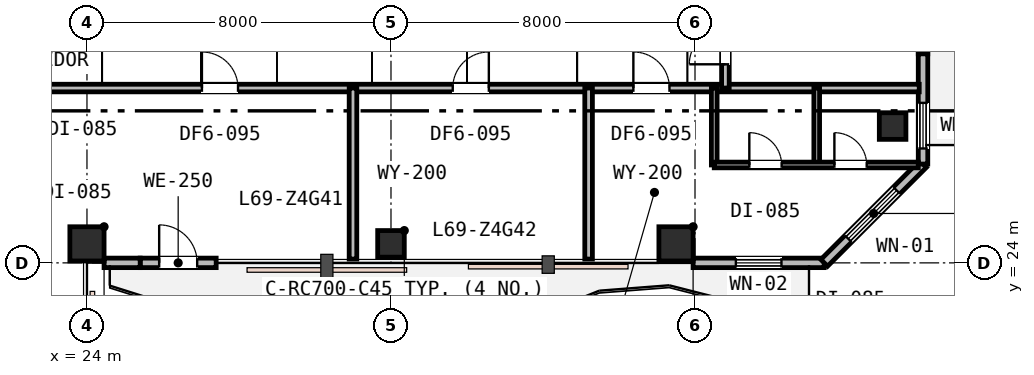
"""IFC4 building model, lengths in metres.
Left out: names, types, materials, properties, quantities, classifications, styles, units other than length and angle.
Written with IfcOpenShell. Run it as: python <this file> out.ifc"""

import sys

from ifc_helpers import new_model, si_unit, direction, frame, frame_2d, origin, origin_2d, place, context, subcontext, project, spatial, rectangle, extrude, element, fill, save


model = new_model("IFC4")
c1 = context("Model", 3, precision=1e-05, world=origin(), true_north=direction((0.0, 1.0)))
c2 = subcontext(c1, "Body", "Model", "MODEL_VIEW")
j1 = project(units=[si_unit("LENGTHUNIT", "METRE"), si_unit("PLANEANGLEUNIT", "RADIAN")], contexts=[c1])
p1 = place(None, origin())
s1 = spatial("IfcSite", under=j1, at=p1, CompositionType="ELEMENT")
p2 = place(p1, origin())
s2 = spatial("IfcBuilding", under=s1, at=p2, CompositionType="ELEMENT")
p3 = place(p2, frame((0.0, 0.0, 267.8)))
s3 = spatial("IfcBuildingStorey", under=s2, at=p3, CompositionType="ELEMENT", Elevation=267.8)
p4 = place(p3, frame((24.0, 24.5, 0.0), z_axis=(0.0, 0.0, 1.0), x_axis=(1.0, 0.0, 0.0)))
e1 = element("IfcColumn", 1, at=p4, inside=s3, PredefinedType="COLUMN", context=c2, shape_type="SweptSolid", body=[
    extrude(rectangle(XDim=0.9, YDim=0.9, at=origin_2d()), origin(), (0.0, 0.0, 1.0), 3.8),
])
p5 = place(p3, frame((32.0, 24.5, 0.0), z_axis=(0.0, 0.0, 1.0), x_axis=(1.0, 0.0, 0.0)))
e2 = element("IfcColumn", 2, at=p5, inside=s3, PredefinedType="COLUMN", context=c2, shape_type="SweptSolid", body=[
    extrude(rectangle(XDim=0.7, YDim=0.7, at=origin_2d()), origin(), (0.0, 0.0, 1.0), 3.8),
])
p6 = place(p3, frame((39.5, 24.5, 0.0), z_axis=(0.0, 0.0, 1.0), x_axis=(1.0, 0.0, 0.0)))
e3 = element("IfcColumn", 3, at=p6, inside=s3, PredefinedType="COLUMN", context=c2, shape_type="SweptSolid", body=[
    extrude(rectangle(XDim=0.9, YDim=0.9, at=origin_2d()), origin(), (0.0, 0.0, 1.0), 3.8),
])
p7 = place(p3, frame((45.2, 27.6, 0.0), z_axis=(0.0, 0.0, 1.0), x_axis=(1.0, 0.0, 0.0)))
e4 = element("IfcColumn", 4, at=p7, inside=s3, PredefinedType="COLUMN", context=c2, shape_type="SweptSolid", body=[
    extrude(rectangle(XDim=0.7, YDim=0.7, at=origin_2d()), origin(), (0.0, 0.0, 1.0), 3.8),
])
p8 = place(p3, frame((25.4, 24.0, 0.0), z_axis=(0.0, 0.0, 1.0), x_axis=(1.0, 0.0, 0.0)))
e5 = element("IfcWall", 5, at=p8, inside=s3, PredefinedType="STANDARD", context=c2, shape_type="SweptSolid", body=[
    extrude(rectangle(XDim=2.0, YDim=0.25, at=frame_2d((1.0, 0.0))), origin(), (0.0, 0.0, 1.0), 3.27),
])
p9 = place(p8, frame((0.5, 0.0, 0.0)))
e6 = element("IfcOpeningElement", 6, at=p9, cuts=e5, PredefinedType="OPENING", context=c2, shape_type="SweptSolid", body=[
    extrude(rectangle(XDim=1.0, YDim=2.15, at=frame_2d((0.5, 1.075))), frame((0.0, 0.135, 0.0), z_axis=(0.0, -1.0, 0.0), x_axis=(1.0, 0.0, 0.0)), (0.0, 0.0, 1.0), 0.27),
])
p10 = place(p3, frame((24.45, 24.0, 0.0), z_axis=(0.0, 0.0, 1.0), x_axis=(1.0, 0.0, 0.0)))
e7 = element("IfcWall", 7, at=p10, inside=s3, PredefinedType="STANDARD", context=c2, shape_type="SweptSolid", body=[
    extrude(rectangle(XDim=0.95, YDim=0.25, at=frame_2d((0.475, 0.0))), origin(), (0.0, 0.0, 1.0), 3.27),
])
p11 = place(p3, frame((39.95, 24.0, 0.0), z_axis=(0.0, 0.0, 1.0), x_axis=(1.0, 0.0, 0.0)))
e8 = element("IfcWall", 8, at=p11, inside=s3, PredefinedType="STANDARD", context=c2, shape_type="SweptSolid", body=[
    extrude(rectangle(XDim=3.45, YDim=0.25, at=frame_2d((1.725, 0.0))), origin(), (0.0, 0.0, 1.0), 3.53),
])
p12 = place(p11, frame((1.125, 0.0, 0.85)))
e9 = element("IfcOpeningElement", 9, at=p12, cuts=e8, PredefinedType="OPENING", context=c2, shape_type="SweptSolid", body=[
    extrude(rectangle(XDim=1.2, YDim=1.6, at=frame_2d((0.6, 0.8))), frame((0.0, 0.135, 0.0), z_axis=(0.0, -1.0, 0.0), x_axis=(1.0, 0.0, 0.0)), (0.0, 0.0, 1.0), 0.27),
])
p13 = place(p3, frame((43.4, 24.0, 0.0), z_axis=(0.0, 0.0, 1.0), x_axis=(0.707106781187, 0.707106781187, 0.0)))
e10 = element("IfcWall", 10, at=p13, inside=s3, PredefinedType="STANDARD", context=c2, shape_type="SweptSolid", body=[
    extrude(rectangle(XDim=3.677, YDim=0.25, at=frame_2d((1.839, 0.0))), origin(), (0.0, 0.0, 1.0), 3.53),
])
p14 = place(p13, frame((0.896, 0.0, 0.75)))
e11 = element("IfcOpeningElement", 11, at=p14, cuts=e10, PredefinedType="OPENING", context=c2, shape_type="SweptSolid", body=[
    extrude(rectangle(XDim=1.8, YDim=1.85, at=frame_2d((0.9, 0.925))), frame((0.0, 0.135, 0.0), z_axis=(0.0, -1.0, 0.0), x_axis=(1.0, 0.0, 0.0)), (0.0, 0.0, 1.0), 0.27),
])
p15 = place(p3, frame((46.0, 29.5, 0.0), z_axis=(0.0, 0.0, 1.0), x_axis=(0.0, 1.0, 0.0)))
e12 = element("IfcWall", 12, at=p15, inside=s3, PredefinedType="STANDARD", context=c2, shape_type="SweptSolid", body=[
    extrude(rectangle(XDim=2.0, YDim=0.25, at=frame_2d((1.0, 0.0))), origin(), (0.0, 0.0, 1.0), 3.53),
])
p16 = place(p15, frame((0.5, 0.0, 0.0)))
e13 = element("IfcOpeningElement", 13, at=p16, cuts=e12, PredefinedType="OPENING", context=c2, shape_type="SweptSolid", body=[
    extrude(rectangle(XDim=1.0, YDim=2.15, at=frame_2d((0.5, 1.075))), frame((0.0, 0.135, 0.0), z_axis=(0.0, -1.0, 0.0), x_axis=(1.0, 0.0, 0.0)), (0.0, 0.0, 1.0), 0.27),
])
p17 = place(p3, frame((46.0, 26.6, 0.0), z_axis=(0.0, 0.0, 1.0), x_axis=(0.0, 1.0, 0.0)))
e14 = element("IfcWall", 14, at=p17, inside=s3, PredefinedType="STANDARD", context=c2, shape_type="SweptSolid", body=[
    extrude(rectangle(XDim=2.9, YDim=0.25, at=frame_2d((1.45, 0.0))), origin(), (0.0, 0.0, 1.0), 3.53),
])
p18 = place(p17, frame((0.41, 0.0, 0.85)))
e15 = element("IfcOpeningElement", 15, at=p18, cuts=e14, PredefinedType="OPENING", context=c2, shape_type="SweptSolid", body=[
    extrude(rectangle(XDim=1.2, YDim=1.6, at=frame_2d((0.6, 0.8))), frame((0.0, 0.135, 0.0), z_axis=(0.0, -1.0, 0.0), x_axis=(1.0, 0.0, 0.0)), (0.0, 0.0, 1.0), 0.27),
])
p19 = place(p3, frame((20.0, 28.6, 0.0), z_axis=(0.0, 0.0, 1.0), x_axis=(1.0, 0.0, 0.0)))
e16 = element("IfcWall", 16, at=p19, inside=s3, PredefinedType="PARTITIONING", context=c2, shape_type="SweptSolid", body=[
    extrude(rectangle(XDim=25.9, YDim=0.2, at=frame_2d((12.95, 0.0))), origin(), (0.0, 0.0, 1.0), 3.16),
])
p20 = place(p19, frame((7.025, 0.0, 0.0)))
e17 = element("IfcOpeningElement", 17, at=p20, cuts=e16, PredefinedType="OPENING", context=c2, shape_type="SweptSolid", body=[
    extrude(rectangle(XDim=0.95, YDim=2.15, at=frame_2d((0.475, 1.075))), frame((0.0, 0.11, 0.0), z_axis=(0.0, -1.0, 0.0), x_axis=(1.0, 0.0, 0.0)), (0.0, 0.0, 1.0), 0.22),
])
p21 = place(p19, frame((13.625, 0.0, 0.0)))
e18 = element("IfcOpeningElement", 18, at=p21, cuts=e16, PredefinedType="OPENING", context=c2, shape_type="SweptSolid", body=[
    extrude(rectangle(XDim=0.95, YDim=2.15, at=frame_2d((0.475, 1.075))), frame((0.0, 0.11, 0.0), z_axis=(0.0, -1.0, 0.0), x_axis=(1.0, 0.0, 0.0)), (0.0, 0.0, 1.0), 0.22),
])
p22 = place(p19, frame((18.378, 0.0, 0.0)))
e19 = element("IfcOpeningElement", 19, at=p22, cuts=e16, PredefinedType="OPENING", context=c2, shape_type="SweptSolid", body=[
    extrude(rectangle(XDim=0.95, YDim=2.15, at=frame_2d((0.475, 1.075))), frame((0.0, 0.11, 0.0), z_axis=(0.0, -1.0, 0.0), x_axis=(1.0, 0.0, 0.0)), (0.0, 0.0, 1.0), 0.22),
])
p23 = place(p3, frame((40.8, 28.6, 0.0), z_axis=(0.0, 0.0, 1.0), x_axis=(0.0, 1.0, 0.0)))
e20 = element("IfcWall", 20, at=p23, inside=s3, PredefinedType="PARTITIONING", context=c2, shape_type="SweptSolid", body=[
    extrude(rectangle(XDim=14.3, YDim=0.2, at=frame_2d((7.15, 0.0))), origin(), (0.0, 0.0, 1.0), 3.16),
])
p24 = place(p23, frame((0.625, 0.0, 0.0)))
e21 = element("IfcOpeningElement", 21, at=p24, cuts=e20, PredefinedType="OPENING", context=c2, shape_type="SweptSolid", body=[
    extrude(rectangle(XDim=0.95, YDim=2.15, at=frame_2d((0.475, 1.075))), frame((0.0, 0.11, 0.0), z_axis=(0.0, -1.0, 0.0), x_axis=(1.0, 0.0, 0.0)), (0.0, 0.0, 1.0), 0.22),
])
for number, where, z_axis, x_axis in (
    (22, (31.0, 24.1, 0.0), (0.0, 0.0, 1.0), (0.0, 1.0, 0.0)),
    (23, (37.2, 24.1, 0.0), (0.0, 0.0, 1.0), (0.0, 1.0, 0.0)),
):
    element("IfcWall", number, at=place(p3, frame(where, z_axis=z_axis, x_axis=x_axis)), inside=s3, PredefinedType="PARTITIONING", context=c2, shape_type="SweptSolid", body=[
        extrude(rectangle(XDim=4.5, YDim=0.2, at=frame_2d((2.25, 0.0))), origin(), (0.0, 0.0, 1.0), 3.27),
    ])
for number, where, z_axis, x_axis in (
    (24, (40.506, 26.576, 0.0), (0.0, 0.0, 1.0), (0.0, 1.0, 0.0)),
    (25, (43.203, 26.576, 0.0), (0.0, 0.0, 1.0), (0.0, 1.0, 0.0)),
):
    element("IfcWall", number, at=place(p3, frame(where, z_axis=z_axis, x_axis=x_axis)), inside=s3, PredefinedType="PARTITIONING", context=c2, shape_type="SweptSolid", body=[
        extrude(rectangle(XDim=2.024, YDim=0.15, at=frame_2d((1.012, 0.0))), origin(), (0.0, 0.0, 1.0), 3.53),
    ])
p25 = place(p3, frame((40.506, 26.576, 0.0), z_axis=(0.0, 0.0, 1.0), x_axis=(1.0, 0.0, 0.0)))
e26 = element("IfcWall", 26, at=p25, inside=s3, PredefinedType="PARTITIONING", context=c2, shape_type="SweptSolid", body=[
    extrude(rectangle(XDim=5.37, YDim=0.15, at=frame_2d((2.685, 0.0))), origin(), (0.0, 0.0, 1.0), 3.53),
])
p26 = place(p25, frame((0.923, 0.0, 0.0)))
e27 = element("IfcOpeningElement", 27, at=p26, cuts=e26, PredefinedType="OPENING", context=c2, shape_type="SweptSolid", body=[
    extrude(rectangle(XDim=0.85, YDim=2.15, at=frame_2d((0.425, 1.075))), frame((0.0, 0.085, 0.0), z_axis=(0.0, -1.0, 0.0), x_axis=(1.0, 0.0, 0.0)), (0.0, 0.0, 1.0), 0.17),
])
p27 = place(p25, frame((3.162, 0.0, 0.0)))
e28 = element("IfcOpeningElement", 28, at=p27, cuts=e26, PredefinedType="OPENING", context=c2, shape_type="SweptSolid", body=[
    extrude(rectangle(XDim=0.85, YDim=2.15, at=frame_2d((0.425, 1.075))), frame((0.0, 0.085, 0.0), z_axis=(0.0, -1.0, 0.0), x_axis=(1.0, 0.0, 0.0)), (0.0, 0.0, 1.0), 0.17),
])
p28 = place(p9, origin())
e29 = element("IfcDoor", 29, at=p28, inside=s3, OperationType="SINGLE_SWING_LEFT", PredefinedType="DOOR", context=c2, shape_type="SweptSolid", body=[
    extrude(rectangle(XDim=1.0, YDim=2.15, at=frame_2d((0.5, 1.075))), frame((0.0, 0.025, 0.0), z_axis=(0.0, -1.0, 0.0), x_axis=(1.0, 0.0, 0.0)), (0.0, 0.0, 1.0), 0.05),
])
fill(e6, e29)
p29 = place(p12, origin())
e30 = element("IfcWindow", 30, at=p29, inside=s3, PartitioningType="SINGLE_PANEL", PredefinedType="WINDOW", context=c2, shape_type="SweptSolid", body=[
    extrude(rectangle(XDim=1.2, YDim=1.6, at=frame_2d((0.6, 0.8))), frame((0.0, 0.03, 0.0), z_axis=(0.0, -1.0, 0.0), x_axis=(1.0, 0.0, 0.0)), (0.0, 0.0, 1.0), 0.06),
])
fill(e9, e30)
p30 = place(p14, origin())
e31 = element("IfcWindow", 31, at=p30, inside=s3, PartitioningType="SINGLE_PANEL", PredefinedType="WINDOW", context=c2, shape_type="SweptSolid", body=[
    extrude(rectangle(XDim=1.8, YDim=1.85, at=frame_2d((0.9, 0.925))), frame((0.0, 0.03, 0.0), z_axis=(0.0, -1.0, 0.0), x_axis=(1.0, 0.0, 0.0)), (0.0, 0.0, 1.0), 0.06),
])
fill(e11, e31)
p31 = place(p18, origin())
e32 = element("IfcWindow", 32, at=p31, inside=s3, PartitioningType="SINGLE_PANEL", PredefinedType="WINDOW", context=c2, shape_type="SweptSolid", body=[
    extrude(rectangle(XDim=1.2, YDim=1.6, at=frame_2d((0.6, 0.8))), frame((0.0, 0.03, 0.0), z_axis=(0.0, -1.0, 0.0), x_axis=(1.0, 0.0, 0.0)), (0.0, 0.0, 1.0), 0.06),
])
fill(e15, e32)
p32 = place(p24, origin())
e33 = element("IfcDoor", 33, at=p32, inside=s3, OperationType="SINGLE_SWING_LEFT", PredefinedType="DOOR", context=c2, shape_type="SweptSolid", body=[
    extrude(rectangle(XDim=0.95, YDim=2.15, at=frame_2d((0.475, 1.075))), frame((0.0, 0.025, 0.0), z_axis=(0.0, -1.0, 0.0), x_axis=(1.0, 0.0, 0.0)), (0.0, 0.0, 1.0), 0.05),
])
fill(e21, e33)
p33 = place(p20, origin())
e34 = element("IfcDoor", 34, at=p33, inside=s3, OperationType="SINGLE_SWING_LEFT", PredefinedType="DOOR", context=c2, shape_type="SweptSolid", body=[
    extrude(rectangle(XDim=0.95, YDim=2.15, at=frame_2d((0.475, 1.075))), frame((0.0, 0.025, 0.0), z_axis=(0.0, -1.0, 0.0), x_axis=(1.0, 0.0, 0.0)), (0.0, 0.0, 1.0), 0.05),
])
fill(e17, e34)
p34 = place(p21, origin())
e35 = element("IfcDoor", 35, at=p34, inside=s3, OperationType="SINGLE_SWING_RIGHT", PredefinedType="DOOR", context=c2, shape_type="SweptSolid", body=[
    extrude(rectangle(XDim=0.95, YDim=2.15, at=frame_2d((0.475, 1.075))), frame((0.0, 0.025, 0.0), z_axis=(0.0, -1.0, 0.0), x_axis=(1.0, 0.0, 0.0)), (0.0, 0.0, 1.0), 0.05),
])
fill(e18, e35)
p35 = place(p22, origin())
e36 = element("IfcDoor", 36, at=p35, inside=s3, OperationType="SINGLE_SWING_LEFT", PredefinedType="DOOR", context=c2, shape_type="SweptSolid", body=[
    extrude(rectangle(XDim=0.95, YDim=2.15, at=frame_2d((0.475, 1.075))), frame((0.0, 0.025, 0.0), z_axis=(0.0, -1.0, 0.0), x_axis=(1.0, 0.0, 0.0)), (0.0, 0.0, 1.0), 0.05),
])
fill(e19, e36)
p36 = place(p26, origin())
e37 = element("IfcDoor", 37, at=p36, inside=s3, OperationType="SINGLE_SWING_LEFT", PredefinedType="DOOR", context=c2, shape_type="SweptSolid", body=[
    extrude(rectangle(XDim=0.85, YDim=2.15, at=frame_2d((0.425, 1.075))), frame((0.0, 0.025, 0.0), z_axis=(0.0, -1.0, 0.0), x_axis=(1.0, 0.0, 0.0)), (0.0, 0.0, 1.0), 0.05),
])
fill(e27, e37)
p37 = place(p27, origin())
e38 = element("IfcDoor", 38, at=p37, inside=s3, OperationType="SINGLE_SWING_LEFT", PredefinedType="DOOR", context=c2, shape_type="SweptSolid", body=[
    extrude(rectangle(XDim=0.85, YDim=2.15, at=frame_2d((0.425, 1.075))), frame((0.0, 0.025, 0.0), z_axis=(0.0, -1.0, 0.0), x_axis=(1.0, 0.0, 0.0)), (0.0, 0.0, 1.0), 0.05),
])
fill(e28, e38)
save(model, sys.argv[1])
